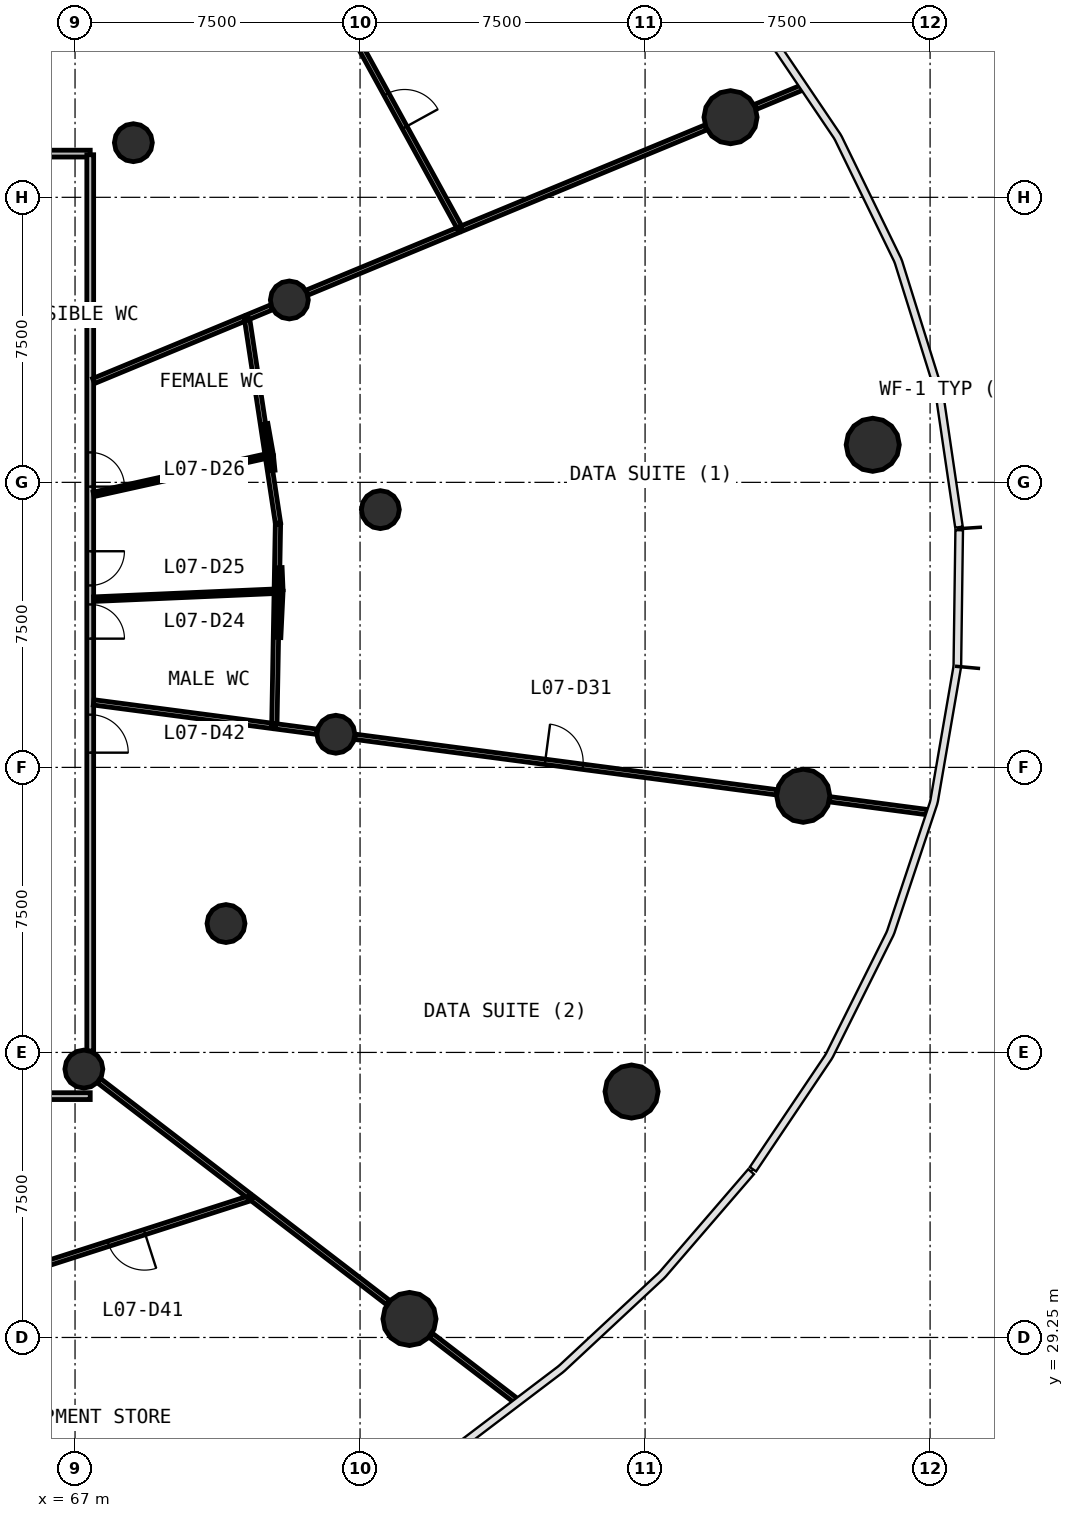
"""IFC4 building model, lengths in metres.
Left out: names, types, materials, properties, quantities, classifications, styles, units other than length and angle.
Written with IfcOpenShell. Run it as: python <this file> out.ifc"""

import sys

from ifc_helpers import new_model, si_unit, direction, frame, frame_2d, origin, origin_2d, place, context, subcontext, project, spatial, rectangle, circle, extrude, source, transform, mapped, element, fill, save


model = new_model("IFC4")
c1 = context("Model", 3, precision=1e-05, world=origin(), true_north=direction((0.0, 1.0)))
c2 = subcontext(c1, "Body", "Model", "MODEL_VIEW")
j1 = project(units=[si_unit("LENGTHUNIT", "METRE"), si_unit("PLANEANGLEUNIT", "RADIAN")], contexts=[c1])
p1 = place(None, origin())
s1 = spatial("IfcSite", under=j1, at=p1, CompositionType="ELEMENT")
p2 = place(p1, origin())
s2 = spatial("IfcBuilding", under=s1, at=p2, CompositionType="ELEMENT")
p3 = place(p2, frame((0.0, 0.0, 31.4)))
s3 = spatial("IfcBuildingStorey", under=s2, at=p3, CompositionType="ELEMENT", Elevation=31.4)
m1 = source(origin(), c2, "Body", "SweptSolid", [
    extrude(circle(Radius=0.7, at=origin_2d()), origin(), (0.0, 0.0, 1.0), 4.4),
])
for number, where, z_axis, x_axis in (
    (1, (87.99, 52.738, 0.0), (0.0, 0.0, 1.0), (1.0, 0.0, 0.0)),
    (2, (84.249, 61.358, 0.0), (0.0, 0.0, 1.0), (1.0, 0.0, 0.0)),
    (3, (75.801, 29.737, 0.0), (0.0, 0.0, 1.0), (1.0, 0.0, 0.0)),
    (4, (81.645, 35.721, 0.0), (0.0, 0.0, 1.0), (1.0, 0.0, 0.0)),
    (5, (86.161, 43.503, 0.0), (0.0, 0.0, 1.0), (1.0, 0.0, 0.0)),
):
    element("IfcColumn", number, at=place(p3, frame(where, z_axis=z_axis, x_axis=x_axis)), inside=s3, PredefinedType="COLUMN", context=c2, shape_type="MappedRepresentation", body=[
        mapped(m1, transform((0.0, 0.0, 0.0), scale=1.0)),
    ])
m2 = source(origin(), c2, "Body", "SweptSolid", [
    extrude(circle(Radius=0.5, at=origin_2d()), origin(), (0.0, 0.0, 1.0), 4.4),
])
for number, where, z_axis, x_axis in (
    (6, (75.034, 51.032, 0.0), (0.0, 0.0, 1.0), (1.0, 0.0, 0.0)),
    (7, (72.639, 56.549, 0.0), (0.0, 0.0, 1.0), (1.0, 0.0, 0.0)),
    (8, (68.535, 60.688, 0.0), (0.0, 0.0, 1.0), (1.0, 0.0, 0.0)),
    (9, (67.232, 36.312, 0.0), (0.0, 0.0, 1.0), (1.0, 0.0, 0.0)),
    (10, (70.972, 40.141, 0.0), (0.0, 0.0, 1.0), (1.0, 0.0, 0.0)),
    (11, (73.863, 45.122, 0.0), (0.0, 0.0, 1.0), (1.0, 0.0, 0.0)),
):
    element("IfcColumn", number, at=place(p3, frame(where, z_axis=z_axis, x_axis=x_axis)), inside=s3, PredefinedType="COLUMN", context=c2, shape_type="MappedRepresentation", body=[
        mapped(m2, transform((0.0, 0.0, 0.0), scale=1.0)),
    ])
p4 = place(p3, frame((67.4, 35.6, 0.0), z_axis=(0.0, 0.0, 1.0), x_axis=(-1.0, 0.0, 0.0)))
e12 = element("IfcWall", 12, at=p4, inside=s3, PredefinedType="PARTITIONING", context=c2, shape_type="SweptSolid", body=[
    extrude(rectangle(XDim=30.8, YDim=0.18, at=frame_2d((15.4, 0.0))), origin(), (0.0, 0.0, 1.0), 3.05),
])
p5 = place(p4, frame((14.95, 0.0, 0.0)))
e13 = element("IfcOpeningElement", 13, at=p5, cuts=e12, PredefinedType="OPENING", context=c2, shape_type="SweptSolid", body=[
    extrude(rectangle(XDim=1.0, YDim=2.1, at=frame_2d((0.5, 1.05))), frame((0.0, 0.1, 0.0), z_axis=(0.0, -1.0, 0.0), x_axis=(1.0, 0.0, 0.0)), (0.0, 0.0, 1.0), 0.2),
])
p6 = place(p4, frame((8.95, 0.0, 0.0)))
e14 = element("IfcOpeningElement", 14, at=p6, cuts=e12, PredefinedType="OPENING", context=c2, shape_type="SweptSolid", body=[
    extrude(rectangle(XDim=1.0, YDim=2.1, at=frame_2d((0.5, 1.05))), frame((0.0, 0.1, 0.0), z_axis=(0.0, -1.0, 0.0), x_axis=(1.0, 0.0, 0.0)), (0.0, 0.0, 1.0), 0.2),
])
p7 = place(p3, frame((36.6, 60.4, 0.0), z_axis=(0.0, 0.0, 1.0), x_axis=(1.0, 0.0, 0.0)))
e15 = element("IfcWall", 15, at=p7, inside=s3, PredefinedType="PARTITIONING", context=c2, shape_type="SweptSolid", body=[
    extrude(rectangle(XDim=30.8, YDim=0.18, at=frame_2d((15.4, 0.0))), origin(), (0.0, 0.0, 1.0), 3.05),
])
p8 = place(p7, frame((20.95, 0.0, 0.0)))
e16 = element("IfcOpeningElement", 16, at=p8, cuts=e15, PredefinedType="OPENING", context=c2, shape_type="SweptSolid", body=[
    extrude(rectangle(XDim=1.0, YDim=2.1, at=frame_2d((0.5, 1.05))), frame((0.0, 0.1, 0.0), z_axis=(0.0, -1.0, 0.0), x_axis=(1.0, 0.0, 0.0)), (0.0, 0.0, 1.0), 0.2),
])
p9 = place(p7, frame((14.95, 0.0, 0.0)))
e17 = element("IfcOpeningElement", 17, at=p9, cuts=e15, PredefinedType="OPENING", context=c2, shape_type="SweptSolid", body=[
    extrude(rectangle(XDim=1.0, YDim=2.1, at=frame_2d((0.5, 1.05))), frame((0.0, 0.1, 0.0), z_axis=(0.0, -1.0, 0.0), x_axis=(1.0, 0.0, 0.0)), (0.0, 0.0, 1.0), 0.2),
])
p10 = place(p3, frame((67.4, 60.37, 0.0), z_axis=(0.0, 0.0, 1.0), x_axis=(0.0, -1.0, 0.0)))
e18 = element("IfcWall", 18, at=p10, inside=s3, PredefinedType="PARTITIONING", context=c2, shape_type="SweptSolid", body=[
    extrude(rectangle(XDim=23.583, YDim=0.18, at=frame_2d((11.791, 0.0))), origin(), (0.0, 0.0, 1.0), 3.05),
])
p11 = place(p10, frame((11.833, 0.0, 0.0)))
e19 = element("IfcOpeningElement", 19, at=p11, cuts=e18, PredefinedType="OPENING", context=c2, shape_type="SweptSolid", body=[
    extrude(rectangle(XDim=0.9, YDim=2.1, at=frame_2d((0.45, 1.05))), frame((0.0, 0.1, 0.0), z_axis=(0.0, -1.0, 0.0), x_axis=(1.0, 0.0, 0.0)), (0.0, 0.0, 1.0), 0.2),
])
p12 = place(p10, frame((10.433, 0.0, 0.0)))
e20 = element("IfcOpeningElement", 20, at=p12, cuts=e18, PredefinedType="OPENING", context=c2, shape_type="SweptSolid", body=[
    extrude(rectangle(XDim=0.9, YDim=2.1, at=frame_2d((0.45, 1.05))), frame((0.0, 0.1, 0.0), z_axis=(0.0, -1.0, 0.0), x_axis=(1.0, 0.0, 0.0)), (0.0, 0.0, 1.0), 0.2),
])
p13 = place(p10, frame((7.833, 0.0, 0.0)))
e21 = element("IfcOpeningElement", 21, at=p13, cuts=e18, PredefinedType="OPENING", context=c2, shape_type="SweptSolid", body=[
    extrude(rectangle(XDim=0.9, YDim=2.1, at=frame_2d((0.45, 1.05))), frame((0.0, 0.1, 0.0), z_axis=(0.0, -1.0, 0.0), x_axis=(1.0, 0.0, 0.0)), (0.0, 0.0, 1.0), 0.2),
])
p14 = place(p10, frame((14.732, 0.0, 0.0)))
e22 = element("IfcOpeningElement", 22, at=p14, cuts=e18, PredefinedType="OPENING", context=c2, shape_type="SweptSolid", body=[
    extrude(rectangle(XDim=1.0, YDim=2.1, at=frame_2d((0.5, 1.05))), frame((0.0, 0.1, 0.0), z_axis=(0.0, -1.0, 0.0), x_axis=(1.0, 0.0, 0.0)), (0.0, 0.0, 1.0), 0.2),
])
p15 = place(p3, frame((74.363, 45.056, 0.0), z_axis=(0.0, 0.0, 1.0), x_axis=(0.991443306772, -0.130538000051, 0.0)))
e23 = element("IfcWall", 23, at=p15, inside=s3, PredefinedType="PARTITIONING", context=c2, shape_type="SweptSolid", body=[
    extrude(rectangle(XDim=11.195, YDim=0.14, at=frame_2d((5.598, 0.0))), origin(), (0.0, 0.0, 1.0), 3.05),
])
p16 = place(p15, frame((5.05, 0.0, 0.0)))
e24 = element("IfcOpeningElement", 24, at=p16, cuts=e23, PredefinedType="OPENING", context=c2, shape_type="SweptSolid", body=[
    extrude(rectangle(XDim=1.0, YDim=2.1, at=frame_2d((0.5, 1.05))), frame((0.0, 0.08, 0.0), z_axis=(0.0, -1.0, 0.0), x_axis=(1.0, 0.0, 0.0)), (0.0, 0.0, 1.0), 0.16),
])
p17 = place(p3, frame((73.726, 64.634, 0.0), z_axis=(0.0, 0.0, 1.0), x_axis=(0.481181569965, -0.876620953848, 0.0)))
e25 = element("IfcWall", 25, at=p17, inside=s3, PredefinedType="PARTITIONING", context=c2, shape_type="SweptSolid", body=[
    extrude(rectangle(XDim=7.096, YDim=0.14, at=frame_2d((3.548, 0.0))), origin(), (0.0, 0.0, 1.0), 3.05),
])
p18 = place(p17, frame((3.046, 0.0, 0.0)))
e26 = element("IfcOpeningElement", 26, at=p18, cuts=e25, PredefinedType="OPENING", context=c2, shape_type="SweptSolid", body=[
    extrude(rectangle(XDim=1.0, YDim=2.1, at=frame_2d((0.5, 1.05))), frame((0.0, 0.08, 0.0), z_axis=(0.0, -1.0, 0.0), x_axis=(1.0, 0.0, 0.0)), (0.0, 0.0, 1.0), 0.16),
])
p19 = place(p3, frame((77.168, 58.425, 0.0), z_axis=(0.0, 0.0, 1.0), x_axis=(0.923883429162, 0.382674024883, 0.0)))
e27 = element("IfcWall", 27, at=p19, inside=s3, PredefinedType="PARTITIONING", context=c2, shape_type="SweptSolid", body=[
    extrude(rectangle(XDim=6.959, YDim=0.14, at=frame_2d((3.479, 0.0))), origin(), (0.0, 0.0, 1.0), 3.05),
])
p20 = place(p3, frame((71.644, 32.927, 0.0), z_axis=(0.0, 0.0, 1.0), x_axis=(-0.952001311543, -0.306093944436, 0.0)))
e28 = element("IfcWall", 28, at=p20, inside=s3, PredefinedType="PARTITIONING", context=c2, shape_type="SweptSolid", body=[
    extrude(rectangle(XDim=6.806, YDim=0.14, at=frame_2d((3.403, 0.0))), origin(), (0.0, 0.0, 1.0), 3.05),
])
p21 = place(p20, frame((2.956, 0.0, 0.0)))
e29 = element("IfcOpeningElement", 29, at=p21, cuts=e28, PredefinedType="OPENING", context=c2, shape_type="SweptSolid", body=[
    extrude(rectangle(XDim=1.0, YDim=2.1, at=frame_2d((0.5, 1.05))), frame((0.0, 0.08, 0.0), z_axis=(0.0, -1.0, 0.0), x_axis=(1.0, 0.0, 0.0)), (0.0, 0.0, 1.0), 0.16),
])
p22 = place(p3, frame((72.341, 50.678, 0.0), z_axis=(0.0, 0.0, 1.0), x_axis=(-0.149839757117, 0.988710294873, 0.0)))
e30 = element("IfcWall", 30, at=p22, inside=s3, PredefinedType="PARTITIONING", context=c2, shape_type="SweptSolid", body=[
    extrude(rectangle(XDim=5.47, YDim=0.14, at=frame_2d((2.735, 0.0))), origin(), (0.0, 0.0, 1.0), 3.05),
])
p23 = place(p3, frame((72.244, 45.335, 0.0), z_axis=(0.0, 0.0, 1.0), x_axis=(0.018055228484, 0.999836991076, 0.0)))
e31 = element("IfcWall", 31, at=p23, inside=s3, PredefinedType="PARTITIONING", context=c2, shape_type="SweptSolid", body=[
    extrude(rectangle(XDim=5.314, YDim=0.14, at=frame_2d((2.657, 0.0))), origin(), (0.0, 0.0, 1.0), 3.05),
])
p24 = place(p3, frame((67.633, 36.005, 0.0), z_axis=(0.0, 0.0, 1.0), x_axis=(0.793344630943, -0.608772779084, 0.0)))
e32 = element("IfcWall", 32, at=p24, inside=s3, PredefinedType="PARTITIONING", context=c2, shape_type="SweptSolid", body=[
    extrude(rectangle(XDim=4.971, YDim=0.14, at=frame_2d((2.485, 0.0))), origin(), (0.0, 0.0, 1.0), 3.05),
])
p25 = place(p3, frame((67.49, 45.961, 0.0), z_axis=(0.0, 0.0, 1.0), x_axis=(0.991444091106, -0.130532042851, 0.0)))
e33 = element("IfcWall", 33, at=p25, inside=s3, PredefinedType="PARTITIONING", context=c2, shape_type="SweptSolid", body=[
    extrude(rectangle(XDim=4.725, YDim=0.14, at=frame_2d((2.362, 0.0))), origin(), (0.0, 0.0, 1.0), 3.05),
])
p26 = place(p3, frame((71.667, 32.908, 0.0), z_axis=(0.0, 0.0, 1.0), x_axis=(0.793390880135, -0.608712503009, 0.0)))
e34 = element("IfcWall", 34, at=p26, inside=s3, PredefinedType="PARTITIONING", context=c2, shape_type="SweptSolid", body=[
    extrude(rectangle(XDim=4.505, YDim=0.14, at=frame_2d((2.253, 0.0))), origin(), (0.0, 0.0, 1.0), 3.05),
])
p27 = place(p3, frame((67.49, 54.416, 0.0), z_axis=(0.0, 0.0, 1.0), x_axis=(0.923879529007, 0.382683440824, 0.0)))
e35 = element("IfcWall", 35, at=p27, inside=s3, PredefinedType="PARTITIONING", context=c2, shape_type="SweptSolid", body=[
    extrude(rectangle(XDim=4.291, YDim=0.14, at=frame_2d((2.146, 0.0))), origin(), (0.0, 0.0, 1.0), 3.05),
])
p28 = place(p3, frame((73.106, 56.742, 0.0), z_axis=(0.0, 0.0, 1.0), x_axis=(0.9238617037, 0.382726472086, 0.0)))
e36 = element("IfcWall", 36, at=p28, inside=s3, PredefinedType="PARTITIONING", context=c2, shape_type="SweptSolid", body=[
    extrude(rectangle(XDim=4.297, YDim=0.14, at=frame_2d((2.148, 0.0))), origin(), (0.0, 0.0, 1.0), 3.05),
])
p29 = place(p3, frame((76.359, 29.309, 0.0), z_axis=(0.0, 0.0, 1.0), x_axis=(0.793282017179, -0.608854367826, 0.0)))
e37 = element("IfcWall", 37, at=p29, inside=s3, PredefinedType="PARTITIONING", context=c2, shape_type="SweptSolid", body=[
    extrude(rectangle(XDim=2.812, YDim=0.14, at=frame_2d((1.406, 0.0))), origin(), (0.0, 0.0, 1.0), 3.05),
])
p30 = place(p3, frame((86.859, 43.411, 0.0), z_axis=(0.0, 0.0, 1.0), x_axis=(0.991441410766, -0.130552399509, 0.0)))
e38 = element("IfcWall", 38, at=p30, inside=s3, PredefinedType="PARTITIONING", context=c2, shape_type="SweptSolid", body=[
    extrude(rectangle(XDim=2.581, YDim=0.14, at=frame_2d((1.29, 0.0))), origin(), (0.0, 0.0, 1.0), 3.05),
])
p31 = place(p3, frame((84.9, 61.628, 0.0), z_axis=(0.0, 0.0, 1.0), x_axis=(0.923887406181, 0.382664423091, 0.0)))
e39 = element("IfcWall", 39, at=p31, inside=s3, PredefinedType="PARTITIONING", context=c2, shape_type="SweptSolid", body=[
    extrude(rectangle(XDim=1.333, YDim=0.14, at=frame_2d((0.667, 0.0))), origin(), (0.0, 0.0, 1.0), 3.05),
])
p32 = place(p3, frame((72.274, 45.331, 0.0), z_axis=(0.0, 0.0, 1.0), x_axis=(0.991457320466, -0.130431521092, 0.0)))
e40 = element("IfcWall", 40, at=p32, inside=s3, PredefinedType="PARTITIONING", context=c2, shape_type="SweptSolid", body=[
    extrude(rectangle(XDim=1.099, YDim=0.14, at=frame_2d((0.549, 0.0))), origin(), (0.0, 0.0, 1.0), 3.05),
])
p33 = place(p3, frame((71.549, 56.097, 0.0), z_axis=(0.0, 0.0, 1.0), x_axis=(0.923972786695, 0.382458219219, 0.0)))
e41 = element("IfcWall", 41, at=p33, inside=s3, PredefinedType="PARTITIONING", context=c2, shape_type="SweptSolid", body=[
    extrude(rectangle(XDim=0.675, YDim=0.14, at=frame_2d((0.338, 0.0))), origin(), (0.0, 0.0, 1.0), 3.05),
])
p34 = place(p3, frame((67.49, 48.676, 0.0), z_axis=(0.0, 0.0, 1.0), x_axis=(0.999048485759, 0.043613336302, 0.0)))
e42 = element("IfcWall", 42, at=p34, inside=s3, PredefinedType="PARTITIONING", context=c2, shape_type="SweptSolid", body=[
    extrude(rectangle(XDim=4.753, YDim=0.12, at=frame_2d((2.376, 0.0))), origin(), (0.0, 0.0, 1.0), 3.05),
])
p35 = place(p3, frame((67.49, 51.434, 0.0), z_axis=(0.0, 0.0, 1.0), x_axis=(0.976290083799, 0.216466330583, 0.0)))
e43 = element("IfcWall", 43, at=p35, inside=s3, PredefinedType="PARTITIONING", context=c2, shape_type="SweptSolid", body=[
    extrude(rectangle(XDim=4.623, YDim=0.12, at=frame_2d((2.312, 0.0))), origin(), (0.0, 0.0, 1.0), 3.05),
])
p36 = place(p3, frame((72.16, 52.469, 0.0), z_axis=(0.0, 0.0, 1.0), x_axis=(-0.174002939191, 0.984745133094, 0.0)))
e44 = element("IfcWall", 44, at=p36, inside=s3, PredefinedType="PARTITIONING", context=c2, shape_type="SweptSolid", body=[
    extrude(rectangle(XDim=0.832, YDim=0.12, at=frame_2d((0.416, 0.0))), origin(), (0.0, 0.0, 1.0), 3.05),
])
p37 = place(p3, frame((72.356, 47.667, 0.0), z_axis=(0.0, 0.0, 1.0), x_axis=(0.047820750853, 0.99885593345, 0.0)))
e45 = element("IfcWall", 45, at=p37, inside=s3, PredefinedType="PARTITIONING", context=c2, shape_type="SweptSolid", body=[
    extrude(rectangle(XDim=1.225, YDim=0.12, at=frame_2d((0.613, 0.0))), origin(), (0.0, 0.0, 1.0), 3.05),
])
p38 = place(p3, frame((72.201, 52.063, 0.0), z_axis=(0.0, 0.0, 1.0), x_axis=(-0.100079053059, 0.994979488803, 0.0)))
e46 = element("IfcWall", 46, at=p38, inside=s3, PredefinedType="PARTITIONING", context=c2, shape_type="SweptSolid", body=[
    extrude(rectangle(XDim=0.378, YDim=0.12, at=frame_2d((0.189, 0.0))), origin(), (0.0, 0.0, 1.0), 3.05),
])
p39 = place(p3, frame((72.414, 48.921, 0.0), z_axis=(0.0, 0.0, 1.0), x_axis=(-0.041717304982, 0.999129454308, 0.0)))
e47 = element("IfcWall", 47, at=p39, inside=s3, PredefinedType="PARTITIONING", context=c2, shape_type="SweptSolid", body=[
    extrude(rectangle(XDim=0.585, YDim=0.12, at=frame_2d((0.292, 0.0))), origin(), (0.0, 0.0, 1.0), 3.05),
])
m3 = source(origin(), c2, "Body", "SweptSolid", [
    extrude(rectangle(XDim=0.9, YDim=2.1, at=frame_2d((0.45, 1.05))), frame((0.0, 0.025, 0.0), z_axis=(0.0, -1.0, 0.0), x_axis=(1.0, 0.0, 0.0)), (0.0, 0.0, 1.0), 0.05),
])
p40 = place(p11, origin())
e48 = element("IfcDoor", 48, at=p40, inside=s3, OperationType="SINGLE_SWING_RIGHT", PredefinedType="DOOR", context=c2, shape_type="MappedRepresentation", body=[
    mapped(m3, transform((0.0, 0.0, 0.0), scale=1.0)),
])
fill(e19, e48)
p41 = place(p12, origin())
e49 = element("IfcDoor", 49, at=p41, inside=s3, OperationType="SINGLE_SWING_LEFT", PredefinedType="DOOR", context=c2, shape_type="MappedRepresentation", body=[
    mapped(m3, transform((0.0, 0.0, 0.0), scale=1.0)),
])
fill(e20, e49)
p42 = place(p13, origin())
e50 = element("IfcDoor", 50, at=p42, inside=s3, OperationType="SINGLE_SWING_RIGHT", PredefinedType="DOOR", context=c2, shape_type="MappedRepresentation", body=[
    mapped(m3, transform((0.0, 0.0, 0.0), scale=1.0)),
])
fill(e21, e50)
m4 = source(origin(), c2, "Body", "SweptSolid", [
    extrude(rectangle(XDim=1.0, YDim=2.1, at=frame_2d((0.5, 1.05))), frame((0.0, 0.025, 0.0), z_axis=(0.0, -1.0, 0.0), x_axis=(1.0, 0.0, 0.0)), (0.0, 0.0, 1.0), 0.05),
])
p43 = place(p18, origin())
e51 = element("IfcDoor", 51, at=p43, inside=s3, OperationType="SINGLE_SWING_RIGHT", PredefinedType="DOOR", context=c2, shape_type="MappedRepresentation", body=[
    mapped(m4, transform((0.0, 0.0, 0.0), scale=1.0)),
])
fill(e26, e51)
p44 = place(p16, origin())
e52 = element("IfcDoor", 52, at=p44, inside=s3, OperationType="SINGLE_SWING_LEFT", PredefinedType="DOOR", context=c2, shape_type="MappedRepresentation", body=[
    mapped(m4, transform((0.0, 0.0, 0.0), scale=1.0)),
])
fill(e24, e52)
p45 = place(p21, origin())
e53 = element("IfcDoor", 53, at=p45, inside=s3, OperationType="SINGLE_SWING_LEFT", PredefinedType="DOOR", context=c2, shape_type="MappedRepresentation", body=[
    mapped(m4, transform((0.0, 0.0, 0.0), scale=1.0)),
])
fill(e29, e53)
p46 = place(p14, origin())
e54 = element("IfcDoor", 54, at=p46, inside=s3, OperationType="SINGLE_SWING_RIGHT", PredefinedType="DOOR", context=c2, shape_type="MappedRepresentation", body=[
    mapped(m4, transform((0.0, 0.0, 0.0), scale=1.0)),
])
fill(e22, e54)
save(model, sys.argv[1])
